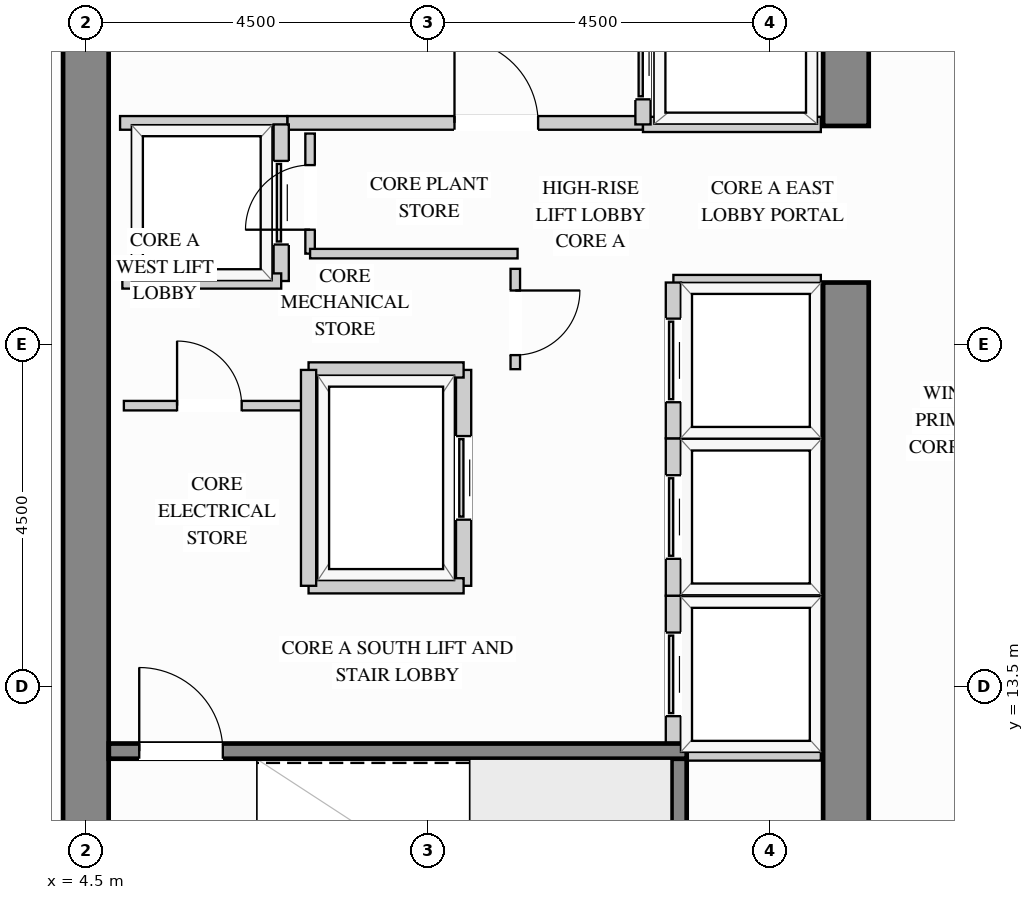
"""IFC4 building model, lengths in metres.
Left out: names, types, materials, properties, quantities, classifications, styles, units other than length and angle.
Written with IfcOpenShell. Run it as: python <this file> out.ifc"""

import sys

from ifc_helpers import new_model, si_unit, direction, frame, frame_2d, origin, place, context, subcontext, project, spatial, rectangle, extrude, source, transform, mapped, element, fill, save


model = new_model("IFC4")
c1 = context("Model", 3, precision=1e-05, world=origin(), true_north=direction((0.0, 1.0)))
c2 = subcontext(c1, "Body", "Model", "MODEL_VIEW")
j1 = project(units=[si_unit("LENGTHUNIT", "METRE"), si_unit("PLANEANGLEUNIT", "RADIAN")], contexts=[c1])
p1 = place(None, origin())
s1 = spatial("IfcSite", under=j1, at=p1, CompositionType="ELEMENT")
p2 = place(p1, origin())
s2 = spatial("IfcBuilding", under=s1, at=p2, CompositionType="ELEMENT")
p3 = place(p2, frame((0.0, 0.0, 143.1)))
s3 = spatial("IfcBuildingStorey", under=s2, at=p3, CompositionType="ELEMENT", Elevation=143.1)
m1 = source(origin(), c2, "Body", "SweptSolid", [
    extrude(rectangle(XDim=10.02, YDim=0.6, at=frame_2d((5.01, 0.0))), origin(), (0.0, 0.0, 1.0), 3.4),
])
p4 = place(p3, frame((14.5, 8.8, 0.0), z_axis=(0.0, 0.0, 1.0), x_axis=(0.0, 1.0, 0.0)))
e1 = element("IfcWall", 1, at=p4, inside=s3, PredefinedType="SHEAR", context=c2, shape_type="MappedRepresentation", body=[
    mapped(m1, transform((0.0, 0.0, 0.0), x_axis=(1.0, 0.0, 0.0), y_axis=(0.0, 1.0, 0.0), z_axis=(0.0, 0.0, 1.0))),
])
m2 = source(origin(), c2, "Body", "SweptSolid", [
    extrude(rectangle(XDim=8.32, YDim=0.6, at=frame_2d((4.16, 0.0))), origin(), (0.0, 0.0, 1.0), 3.4),
])
p5 = place(p3, frame((14.5, 20.88, 0.0), z_axis=(0.0, 0.0, 1.0), x_axis=(0.0, 1.0, 0.0)))
e2 = element("IfcWall", 2, at=p5, inside=s3, PredefinedType="SHEAR", context=c2, shape_type="MappedRepresentation", body=[
    mapped(m2, transform((0.0, 0.0, 0.0), x_axis=(1.0, 0.0, 0.0), y_axis=(0.0, 1.0, 0.0), z_axis=(0.0, 0.0, 1.0))),
])
m3 = source(origin(), c2, "Body", "SweptSolid", [
    extrude(rectangle(XDim=20.4, YDim=0.6, at=frame_2d((10.2, 0.0))), origin(), (0.0, 0.0, 1.0), 3.4),
])
p6 = place(p3, frame((4.5, 8.8, 0.0), z_axis=(0.0, 0.0, 1.0), x_axis=(0.0, 1.0, 0.0)))
e3 = element("IfcWall", 3, at=p6, inside=s3, PredefinedType="SHEAR", context=c2, shape_type="MappedRepresentation", body=[
    mapped(m3, transform((0.0, 0.0, 0.0), x_axis=(1.0, 0.0, 0.0), y_axis=(0.0, 1.0, 0.0), z_axis=(0.0, 0.0, 1.0))),
])
p7 = place(p3, frame((7.15, 20.92, 0.0), z_axis=(0.0, 0.0, 1.0), x_axis=(1.0, 0.0, 0.0)))
e4 = element("IfcWall", 4, at=p7, inside=s3, PredefinedType="PARTITIONING", context=c2, shape_type="SweptSolid", body=[
    extrude(rectangle(XDim=4.68, YDim=0.18, at=frame_2d((2.34, 0.0))), origin(), (0.0, 0.0, 1.0), 3.385),
])
p8 = place(p7, frame((2.2, 0.0, 0.0)))
e5 = element("IfcOpeningElement", 5, at=p8, cuts=e4, PredefinedType="OPENING", context=c2, shape_type="SweptSolid", body=[
    extrude(rectangle(XDim=1.1, YDim=2.15, at=frame_2d((0.55, 1.075))), frame((0.0, 0.1, 0.0), z_axis=(0.0, -1.0, 0.0), x_axis=(1.0, 0.0, 0.0)), (0.0, 0.0, 1.0), 0.2),
])
m4 = source(origin(), c2, "Body", "SweptSolid", [
    extrude(rectangle(XDim=2.2, YDim=0.18, at=frame_2d((1.1, 0.0))), origin(), (0.0, 0.0, 1.0), 3.385),
])
p9 = place(p3, frame((4.95, 20.92, 0.0), z_axis=(0.0, 0.0, 1.0), x_axis=(1.0, 0.0, 0.0)))
e6 = element("IfcWall", 6, at=p9, inside=s3, PredefinedType="PARTITIONING", context=c2, shape_type="MappedRepresentation", body=[
    mapped(m4, transform((0.0, 0.0, 0.0), x_axis=(1.0, 0.0, 0.0), y_axis=(0.0, 1.0, 0.0), z_axis=(0.0, 0.0, 1.0))),
])
p10 = place(p3, frame((10.15, 17.68, 0.0), z_axis=(0.0, 0.0, 1.0), x_axis=(0.0, 1.0, 0.0)))
e7 = element("IfcWall", 7, at=p10, inside=s3, PredefinedType="PARTITIONING", context=c2, shape_type="SweptSolid", body=[
    extrude(rectangle(XDim=1.32, YDim=0.125, at=frame_2d((0.66, 0.0))), origin(), (0.0, 0.0, 1.0), 3.385),
])
p11 = place(p10, frame((0.185, 0.0, 0.0)))
e8 = element("IfcOpeningElement", 8, at=p11, cuts=e7, PredefinedType="OPENING", context=c2, shape_type="SweptSolid", body=[
    extrude(rectangle(XDim=0.85, YDim=2.1, at=frame_2d((0.425, 1.05))), frame((0.0, 0.073, 0.0), z_axis=(0.0, -1.0, 0.0), x_axis=(1.0, 0.0, 0.0)), (0.0, 0.0, 1.0), 0.145),
])
p12 = place(p3, frame((7.45, 19.2, 0.0), z_axis=(0.0, 0.0, 1.0), x_axis=(0.0, 1.0, 0.0)))
e9 = element("IfcWall", 9, at=p12, inside=s3, PredefinedType="PARTITIONING", context=c2, shape_type="SweptSolid", body=[
    extrude(rectangle(XDim=1.58, YDim=0.125, at=frame_2d((0.79, 0.0))), origin(), (0.0, 0.0, 1.0), 3.385),
])
p13 = place(p12, frame((0.315, 0.0, 0.0)))
e10 = element("IfcOpeningElement", 10, at=p13, cuts=e9, PredefinedType="OPENING", context=c2, shape_type="SweptSolid", body=[
    extrude(rectangle(XDim=0.85, YDim=2.1, at=frame_2d((0.425, 1.05))), frame((0.0, 0.073, 0.0), z_axis=(0.0, -1.0, 0.0), x_axis=(1.0, 0.0, 0.0)), (0.0, 0.0, 1.0), 0.145),
])
m5 = source(origin(), c2, "Body", "SweptSolid", [
    extrude(rectangle(XDim=2.73, YDim=0.125, at=frame_2d((1.365, 0.0))), origin(), (0.0, 0.0, 1.0), 3.385),
])
p14 = place(p3, frame((7.45, 19.2, 0.0), z_axis=(0.0, 0.0, 1.0), x_axis=(1.0, 0.0, 0.0)))
e11 = element("IfcWall", 11, at=p14, inside=s3, PredefinedType="PARTITIONING", context=c2, shape_type="MappedRepresentation", body=[
    mapped(m5, transform((0.0, 0.0, 0.0), x_axis=(1.0, 0.0, 0.0), y_axis=(0.0, 1.0, 0.0), z_axis=(0.0, 0.0, 1.0))),
])
p15 = place(p3, frame((5.0, 17.2, 0.0), z_axis=(0.0, 0.0, 1.0), x_axis=(1.0, 0.0, 0.0)))
e12 = element("IfcWall", 12, at=p15, inside=s3, PredefinedType="PARTITIONING", context=c2, shape_type="SweptSolid", body=[
    extrude(rectangle(XDim=2.4, YDim=0.125, at=frame_2d((1.2, 0.0))), origin(), (0.0, 0.0, 1.0), 3.385),
])
p16 = place(p15, frame((0.7, 0.0, 0.0)))
e13 = element("IfcOpeningElement", 13, at=p16, cuts=e12, PredefinedType="OPENING", context=c2, shape_type="SweptSolid", body=[
    extrude(rectangle(XDim=0.85, YDim=2.1, at=frame_2d((0.425, 1.05))), frame((0.0, 0.073, 0.0), z_axis=(0.0, -1.0, 0.0), x_axis=(1.0, 0.0, 0.0)), (0.0, 0.0, 1.0), 0.145),
])
m6 = source(origin(), c2, "Body", "SweptSolid", [
    extrude(rectangle(XDim=2.34, YDim=0.2, at=frame_2d((1.17, 0.0))), origin(), (0.0, 0.0, 1.0), 3.385),
])
p17 = place(p3, frame((11.83, 20.9, 0.0), z_axis=(0.0, 0.0, 1.0), x_axis=(1.0, 0.0, 0.0)))
e14 = element("IfcWall", 14, at=p17, inside=s3, PredefinedType="PARTITIONING", context=c2, shape_type="MappedRepresentation", body=[
    mapped(m6, transform((0.0, 0.0, 0.0), x_axis=(1.0, 0.0, 0.0), y_axis=(0.0, 1.0, 0.0), z_axis=(0.0, 0.0, 1.0))),
])
p18 = place(p3, frame((11.83, 20.9, 0.0), z_axis=(0.0, 0.0, 1.0), x_axis=(0.0, 1.0, 0.0)))
e15 = element("IfcWall", 15, at=p18, inside=s3, PredefinedType="PARTITIONING", context=c2, shape_type="SweptSolid", body=[
    extrude(rectangle(XDim=1.76, YDim=0.2, at=frame_2d((0.88, 0.0))), origin(), (0.0, 0.0, 1.0), 3.385),
])
p19 = place(p18, frame((0.33, 0.0, 0.0)))
e16 = element("IfcOpeningElement", 16, at=p19, cuts=e15, PredefinedType="OPENING", context=c2, shape_type="SweptSolid", body=[
    extrude(rectangle(XDim=1.1, YDim=2.2, at=frame_2d((0.55, 1.1))), frame((0.0, 0.11, 0.0), z_axis=(0.0, -1.0, 0.0), x_axis=(1.0, 0.0, 0.0)), (0.0, 0.0, 1.0), 0.22),
])
m7 = source(origin(), c2, "Body", "SweptSolid", [
    extrude(rectangle(XDim=1.94, YDim=0.2, at=frame_2d((0.97, 0.0))), origin(), (0.0, 0.0, 1.0), 3.385),
])
for number, where, z_axis, x_axis in (
    (17, (12.23, 14.7, 0.0), (0.0, 0.0, 1.0), (1.0, 0.0, 0.0)),
    (18, (12.23, 12.63, 0.0), (0.0, 0.0, 1.0), (1.0, 0.0, 0.0)),
):
    element("IfcWall", number, at=place(p3, frame(where, z_axis=z_axis, x_axis=x_axis)), inside=s3, PredefinedType="PARTITIONING", context=c2, shape_type="MappedRepresentation", body=[
        mapped(m7, transform((0.0, 0.0, 0.0), x_axis=(1.0, 0.0, 0.0), y_axis=(0.0, 1.0, 0.0), z_axis=(0.0, 0.0, 1.0))),
    ])
p20 = place(p3, frame((12.23, 12.63, 0.0), z_axis=(0.0, 0.0, 1.0), x_axis=(0.0, 1.0, 0.0)))
e19 = element("IfcWall", 19, at=p20, inside=s3, PredefinedType="PARTITIONING", context=c2, shape_type="SweptSolid", body=[
    extrude(rectangle(XDim=2.07, YDim=0.2, at=frame_2d((1.035, 0.0))), origin(), (0.0, 0.0, 1.0), 3.385),
])
p21 = place(p20, frame((0.485, 0.0, 0.0)))
e20 = element("IfcOpeningElement", 20, at=p21, cuts=e19, PredefinedType="OPENING", context=c2, shape_type="SweptSolid", body=[
    extrude(rectangle(XDim=1.1, YDim=2.2, at=frame_2d((0.55, 1.1))), frame((0.0, 0.11, 0.0), z_axis=(0.0, -1.0, 0.0), x_axis=(1.0, 0.0, 0.0)), (0.0, 0.0, 1.0), 0.22),
])
p22 = place(p3, frame((12.23, 16.77, 0.0), z_axis=(0.0, 0.0, 1.0), x_axis=(1.0, 0.0, 0.0)))
e21 = element("IfcWall", 21, at=p22, inside=s3, PredefinedType="PARTITIONING", context=c2, shape_type="MappedRepresentation", body=[
    mapped(m7, transform((0.0, 0.0, 0.0), x_axis=(1.0, 0.0, 0.0), y_axis=(0.0, 1.0, 0.0), z_axis=(0.0, 0.0, 1.0))),
])
p23 = place(p3, frame((12.23, 14.7, 0.0), z_axis=(0.0, 0.0, 1.0), x_axis=(0.0, 1.0, 0.0)))
e22 = element("IfcWall", 22, at=p23, inside=s3, PredefinedType="PARTITIONING", context=c2, shape_type="SweptSolid", body=[
    extrude(rectangle(XDim=2.07, YDim=0.2, at=frame_2d((1.035, 0.0))), origin(), (0.0, 0.0, 1.0), 3.385),
])
p24 = place(p23, frame((0.485, 0.0, 0.0)))
e23 = element("IfcOpeningElement", 23, at=p24, cuts=e22, PredefinedType="OPENING", context=c2, shape_type="SweptSolid", body=[
    extrude(rectangle(XDim=1.1, YDim=2.2, at=frame_2d((0.55, 1.1))), frame((0.0, 0.11, 0.0), z_axis=(0.0, -1.0, 0.0), x_axis=(1.0, 0.0, 0.0)), (0.0, 0.0, 1.0), 0.22),
])
p25 = place(p3, frame((12.23, 18.82, 0.0), z_axis=(0.0, 0.0, 1.0), x_axis=(1.0, 0.0, 0.0)))
e24 = element("IfcWall", 24, at=p25, inside=s3, PredefinedType="PARTITIONING", context=c2, shape_type="MappedRepresentation", body=[
    mapped(m7, transform((0.0, 0.0, 0.0), x_axis=(1.0, 0.0, 0.0), y_axis=(0.0, 1.0, 0.0), z_axis=(0.0, 0.0, 1.0))),
])
p26 = place(p3, frame((12.23, 16.77, 0.0), z_axis=(0.0, 0.0, 1.0), x_axis=(0.0, 1.0, 0.0)))
e25 = element("IfcWall", 25, at=p26, inside=s3, PredefinedType="PARTITIONING", context=c2, shape_type="SweptSolid", body=[
    extrude(rectangle(XDim=2.05, YDim=0.2, at=frame_2d((1.025, 0.0))), origin(), (0.0, 0.0, 1.0), 3.385),
])
p27 = place(p26, frame((0.475, 0.0, 0.0)))
e26 = element("IfcOpeningElement", 26, at=p27, cuts=e25, PredefinedType="OPENING", context=c2, shape_type="SweptSolid", body=[
    extrude(rectangle(XDim=1.1, YDim=2.2, at=frame_2d((0.55, 1.1))), frame((0.0, 0.11, 0.0), z_axis=(0.0, -1.0, 0.0), x_axis=(1.0, 0.0, 0.0)), (0.0, 0.0, 1.0), 0.22),
])
p28 = place(p3, frame((7.07, 18.84, 0.0), z_axis=(0.0, 0.0, 1.0), x_axis=(0.0, 1.0, 0.0)))
e27 = element("IfcWall", 27, at=p28, inside=s3, PredefinedType="PARTITIONING", context=c2, shape_type="SweptSolid", body=[
    extrude(rectangle(XDim=2.06, YDim=0.2, at=frame_2d((1.03, 0.0))), origin(), (0.0, 0.0, 1.0), 3.385),
])
p29 = place(p28, frame((0.48, 0.0, 0.0)))
e28 = element("IfcOpeningElement", 28, at=p29, cuts=e27, PredefinedType="OPENING", context=c2, shape_type="SweptSolid", body=[
    extrude(rectangle(XDim=1.1, YDim=2.2, at=frame_2d((0.55, 1.1))), frame((0.0, 0.11, 0.0), z_axis=(0.0, -1.0, 0.0), x_axis=(1.0, 0.0, 0.0)), (0.0, 0.0, 1.0), 0.22),
])
m8 = source(origin(), c2, "Body", "SweptSolid", [
    extrude(rectangle(XDim=2.09, YDim=0.2, at=frame_2d((1.045, 0.0))), origin(), (0.0, 0.0, 1.0), 3.385),
])
p30 = place(p3, frame((4.98, 18.84, 0.0), z_axis=(0.0, 0.0, 1.0), x_axis=(1.0, 0.0, 0.0)))
e29 = element("IfcWall", 29, at=p30, inside=s3, PredefinedType="PARTITIONING", context=c2, shape_type="MappedRepresentation", body=[
    mapped(m8, transform((0.0, 0.0, 0.0), x_axis=(1.0, 0.0, 0.0), y_axis=(0.0, 1.0, 0.0), z_axis=(0.0, 0.0, 1.0))),
])
p31 = place(p3, frame((9.47, 14.83, 0.0), z_axis=(0.0, 0.0, 1.0), x_axis=(0.0, 1.0, 0.0)))
e30 = element("IfcWall", 30, at=p31, inside=s3, PredefinedType="PARTITIONING", context=c2, shape_type="SweptSolid", body=[
    extrude(rectangle(XDim=2.84, YDim=0.2, at=frame_2d((1.42, 0.0))), origin(), (0.0, 0.0, 1.0), 3.385),
])
p32 = place(p31, frame((0.87, 0.0, 0.0)))
e31 = element("IfcOpeningElement", 31, at=p32, cuts=e30, PredefinedType="OPENING", context=c2, shape_type="SweptSolid", body=[
    extrude(rectangle(XDim=1.1, YDim=2.2, at=frame_2d((0.55, 1.1))), frame((0.0, 0.11, 0.0), z_axis=(0.0, -1.0, 0.0), x_axis=(1.0, 0.0, 0.0)), (0.0, 0.0, 1.0), 0.22),
])
m9 = source(origin(), c2, "Body", "SweptSolid", [
    extrude(rectangle(XDim=2.04, YDim=0.2, at=frame_2d((1.02, 0.0))), origin(), (0.0, 0.0, 1.0), 3.385),
])
for number, where, z_axis, x_axis in (
    (32, (7.43, 17.67, 0.0), (0.0, 0.0, 1.0), (1.0, 0.0, 0.0)),
    (33, (7.43, 14.83, 0.0), (0.0, 0.0, 1.0), (1.0, 0.0, 0.0)),
):
    element("IfcWall", number, at=place(p3, frame(where, z_axis=z_axis, x_axis=x_axis)), inside=s3, PredefinedType="PARTITIONING", context=c2, shape_type="MappedRepresentation", body=[
        mapped(m9, transform((0.0, 0.0, 0.0), x_axis=(1.0, 0.0, 0.0), y_axis=(0.0, 1.0, 0.0), z_axis=(0.0, 0.0, 1.0))),
    ])
m10 = source(origin(), c2, "Body", "SweptSolid", [
    extrude(rectangle(XDim=2.84, YDim=0.2, at=frame_2d((1.42, 0.0))), origin(), (0.0, 0.0, 1.0), 3.385),
])
p33 = place(p3, frame((7.43, 14.83, 0.0), z_axis=(0.0, 0.0, 1.0), x_axis=(0.0, 1.0, 0.0)))
e34 = element("IfcWall", 34, at=p33, inside=s3, PredefinedType="PARTITIONING", context=c2, shape_type="MappedRepresentation", body=[
    mapped(m10, transform((0.0, 0.0, 0.0), x_axis=(1.0, 0.0, 0.0), y_axis=(0.0, 1.0, 0.0), z_axis=(0.0, 0.0, 1.0))),
])
m11 = source(origin(), c2, "Body", "SweptSolid", [
    extrude(rectangle(XDim=3.753, YDim=0.2, at=frame_2d((1.876, 0.0))), origin(), (0.0, 0.0, 1.0), 3.4),
])
p34 = place(p3, frame((12.305, 8.802, 0.0), z_axis=(0.0, 0.0, 1.0), x_axis=(0.0, 1.0, 0.0)))
e35 = element("IfcWall", 35, at=p34, inside=s3, PredefinedType="SHEAR", context=c2, shape_type="MappedRepresentation", body=[
    mapped(m11, transform((0.0, 0.0, 0.0), x_axis=(1.0, 0.0, 0.0), y_axis=(0.0, 1.0, 0.0), z_axis=(0.0, 0.0, 1.0))),
])
p35 = place(p3, frame((4.802, 12.655, 0.0), z_axis=(0.0, 0.0, 1.0), x_axis=(1.0, 0.0, 0.0)))
e36 = element("IfcWall", 36, at=p35, inside=s3, PredefinedType="SHEAR", context=c2, shape_type="SweptSolid", body=[
    extrude(rectangle(XDim=7.603, YDim=0.2, at=frame_2d((3.802, 0.0))), origin(), (0.0, 0.0, 1.0), 3.4),
])
p36 = place(p35, frame((0.4, 0.0, 0.0)))
e37 = element("IfcOpeningElement", 37, at=p36, cuts=e36, PredefinedType="OPENING", context=c2, shape_type="SweptSolid", body=[
    extrude(rectangle(XDim=1.1, YDim=2.15, at=frame_2d((0.55, 1.075))), frame((0.0, 0.11, 0.0), z_axis=(0.0, -1.0, 0.0), x_axis=(1.0, 0.0, 0.0)), (0.0, 0.0, 1.0), 0.22),
])
m12 = source(origin(), c2, "Body", "SweptSolid", [
    extrude(rectangle(XDim=1.1, YDim=2.15, at=frame_2d((0.55, 1.075))), frame((0.0, 0.025, 0.0), z_axis=(0.0, -1.0, 0.0), x_axis=(1.0, 0.0, 0.0)), (0.0, 0.0, 1.0), 0.05),
])
p37 = place(p8, origin())
e38 = element("IfcDoor", 38, at=p37, inside=s3, OperationType="SINGLE_SWING_LEFT", PredefinedType="DOOR", context=c2, shape_type="MappedRepresentation", body=[
    mapped(m12, transform((0.0, 0.0, 0.0), x_axis=(1.0, 0.0, 0.0), y_axis=(0.0, 1.0, 0.0), z_axis=(0.0, 0.0, 1.0))),
])
fill(e5, e38)
m13 = source(origin(), c2, "Body", "SweptSolid", [
    extrude(rectangle(XDim=1.1, YDim=2.2, at=frame_2d((0.55, 1.1))), frame((0.0, 0.025, 0.0), z_axis=(0.0, -1.0, 0.0), x_axis=(1.0, 0.0, 0.0)), (0.0, 0.0, 1.0), 0.05),
])
p38 = place(p19, origin())
e39 = element("IfcDoor", 39, at=p38, inside=s3, OperationType="SLIDING_TO_LEFT", PredefinedType="DOOR", context=c2, shape_type="MappedRepresentation", body=[
    mapped(m13, transform((0.0, 0.0, 0.0), x_axis=(1.0, 0.0, 0.0), y_axis=(0.0, 1.0, 0.0), z_axis=(0.0, 0.0, 1.0))),
])
fill(e16, e39)
p39 = place(p21, origin())
e40 = element("IfcDoor", 40, at=p39, inside=s3, OperationType="SLIDING_TO_LEFT", PredefinedType="DOOR", context=c2, shape_type="MappedRepresentation", body=[
    mapped(m13, transform((0.0, 0.0, 0.0), x_axis=(1.0, 0.0, 0.0), y_axis=(0.0, 1.0, 0.0), z_axis=(0.0, 0.0, 1.0))),
])
fill(e20, e40)
p40 = place(p24, origin())
e41 = element("IfcDoor", 41, at=p40, inside=s3, OperationType="SLIDING_TO_LEFT", PredefinedType="DOOR", context=c2, shape_type="MappedRepresentation", body=[
    mapped(m13, transform((0.0, 0.0, 0.0), x_axis=(1.0, 0.0, 0.0), y_axis=(0.0, 1.0, 0.0), z_axis=(0.0, 0.0, 1.0))),
])
fill(e23, e41)
p41 = place(p27, origin())
e42 = element("IfcDoor", 42, at=p41, inside=s3, OperationType="SLIDING_TO_LEFT", PredefinedType="DOOR", context=c2, shape_type="MappedRepresentation", body=[
    mapped(m13, transform((0.0, 0.0, 0.0), x_axis=(1.0, 0.0, 0.0), y_axis=(0.0, 1.0, 0.0), z_axis=(0.0, 0.0, 1.0))),
])
fill(e26, e42)
p42 = place(p29, origin())
e43 = element("IfcDoor", 43, at=p42, inside=s3, OperationType="SLIDING_TO_LEFT", PredefinedType="DOOR", context=c2, shape_type="MappedRepresentation", body=[
    mapped(m13, transform((0.0, 0.0, 0.0), x_axis=(1.0, 0.0, 0.0), y_axis=(0.0, 1.0, 0.0), z_axis=(0.0, 0.0, 1.0))),
])
fill(e28, e43)
p43 = place(p32, origin())
e44 = element("IfcDoor", 44, at=p43, inside=s3, OperationType="SLIDING_TO_LEFT", PredefinedType="DOOR", context=c2, shape_type="MappedRepresentation", body=[
    mapped(m13, transform((0.0, 0.0, 0.0), x_axis=(1.0, 0.0, 0.0), y_axis=(0.0, 1.0, 0.0), z_axis=(0.0, 0.0, 1.0))),
])
fill(e31, e44)
m14 = source(origin(), c2, "Body", "SweptSolid", [
    extrude(rectangle(XDim=0.85, YDim=2.1, at=frame_2d((0.425, 1.05))), frame((0.0, 0.025, 0.0), z_axis=(0.0, -1.0, 0.0), x_axis=(1.0, 0.0, 0.0)), (0.0, 0.0, 1.0), 0.05),
])
p44 = place(p11, origin())
e45 = element("IfcDoor", 45, at=p44, inside=s3, OperationType="SINGLE_SWING_RIGHT", PredefinedType="DOOR", context=c2, shape_type="MappedRepresentation", body=[
    mapped(m14, transform((0.0, 0.0, 0.0), x_axis=(1.0, 0.0, 0.0), y_axis=(0.0, 1.0, 0.0), z_axis=(0.0, 0.0, 1.0))),
])
fill(e8, e45)
p45 = place(p16, origin())
e46 = element("IfcDoor", 46, at=p45, inside=s3, OperationType="SINGLE_SWING_LEFT", PredefinedType="DOOR", context=c2, shape_type="MappedRepresentation", body=[
    mapped(m14, transform((0.0, 0.0, 0.0), x_axis=(1.0, 0.0, 0.0), y_axis=(0.0, 1.0, 0.0), z_axis=(0.0, 0.0, 1.0))),
])
fill(e13, e46)
p46 = place(p13, origin())
e47 = element("IfcDoor", 47, at=p46, inside=s3, OperationType="SINGLE_SWING_LEFT", PredefinedType="DOOR", context=c2, shape_type="MappedRepresentation", body=[
    mapped(m14, transform((0.0, 0.0, 0.0), x_axis=(1.0, 0.0, 0.0), y_axis=(0.0, 1.0, 0.0), z_axis=(0.0, 0.0, 1.0))),
])
fill(e10, e47)
m15 = source(origin(), c2, "Body", "SweptSolid", [
    extrude(rectangle(XDim=1.1, YDim=2.15, at=frame_2d((0.55, 1.075))), frame((0.0, 0.025, 0.0), z_axis=(0.0, -1.0, 0.0), x_axis=(1.0, 0.0, 0.0)), (0.0, 0.0, 1.0), 0.05),
])
p47 = place(p36, origin())
e48 = element("IfcDoor", 48, at=p47, inside=s3, OperationType="SINGLE_SWING_LEFT", PredefinedType="DOOR", context=c2, shape_type="MappedRepresentation", body=[
    mapped(m15, transform((0.0, 0.0, 0.0), x_axis=(1.0, 0.0, 0.0), y_axis=(0.0, 1.0, 0.0), z_axis=(0.0, 0.0, 1.0))),
])
fill(e37, e48)
save(model, sys.argv[1])
